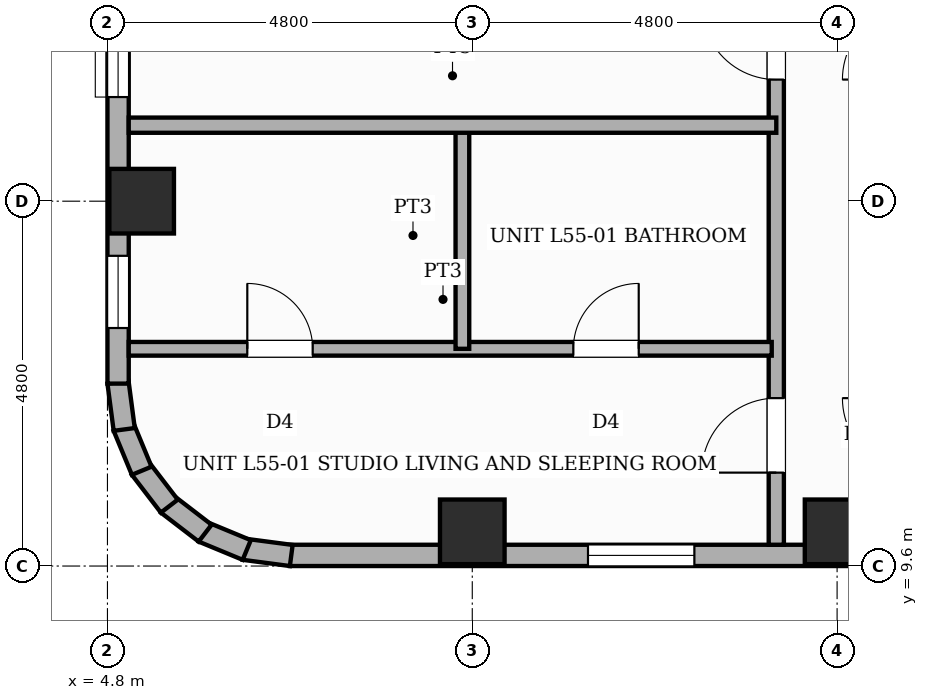
"""IFC4 building model, lengths in metres.
Left out: names, types, materials, properties, quantities, classifications, styles, units other than length and angle.
Written with IfcOpenShell. Run it as: python <this file> out.ifc"""

import sys

from ifc_helpers import new_model, si_unit, direction, frame, frame_2d, origin, origin_2d, place, context, subcontext, project, spatial, rectangle, extrude, element, fill, save


model = new_model("IFC4")
c1 = context("Model", 3, precision=1e-05, world=origin(), true_north=direction((0.0, 1.0)))
c2 = subcontext(c1, "Body", "Model", "MODEL_VIEW")
j1 = project(units=[si_unit("LENGTHUNIT", "METRE"), si_unit("PLANEANGLEUNIT", "RADIAN")], contexts=[c1])
p1 = place(None, origin())
s1 = spatial("IfcSite", under=j1, at=p1, CompositionType="ELEMENT")
p2 = place(p1, origin())
s2 = spatial("IfcBuilding", under=s1, at=p2, CompositionType="ELEMENT")
p3 = place(p2, frame((0.0, 0.0, 211.0)))
s3 = spatial("IfcBuildingStorey", under=s2, at=p3, CompositionType="ELEMENT", Elevation=211.0)
for number, where, z_axis, x_axis in (
    (1, (5.25, 14.4, 0.0), (0.0, 0.0, 1.0), (1.0, 0.0, 0.0)),
    (2, (9.6, 10.05, 0.0), (0.0, 0.0, 1.0), (1.0, 0.0, 0.0)),
    (3, (14.4, 10.05, 0.0), (0.0, 0.0, 1.0), (1.0, 0.0, 0.0)),
):
    element("IfcColumn", number, at=place(p3, frame(where, z_axis=z_axis, x_axis=x_axis)), inside=s3, PredefinedType="COLUMN", context=c2, shape_type="SweptSolid", body=[
        extrude(rectangle(XDim=0.85, YDim=0.85, at=origin_2d()), origin(), (0.0, 0.0, 1.0), 3.6),
    ])
p4 = place(p3, frame((21.6, 9.74, 0.0), z_axis=(0.0, 0.0, 1.0), x_axis=(-1.0, 0.0, 0.0)))
e4 = element("IfcWall", 4, at=p4, inside=s3, PredefinedType="STANDARD", context=c2, shape_type="SweptSolid", body=[
    extrude(rectangle(XDim=14.4, YDim=0.28, at=frame_2d((7.2, 0.0))), origin(), (0.0, 0.0, 1.0), 2.66),
])
p5 = place(p4, frame((9.077, 0.0, 0.65)))
e5 = element("IfcOpeningElement", 5, at=p5, cuts=e4, PredefinedType="OPENING", context=c2, shape_type="SweptSolid", body=[
    extrude(rectangle(XDim=1.4, YDim=1.1, at=frame_2d((0.7, 0.55))), frame((0.0, 0.15, 0.0), z_axis=(0.0, -1.0, 0.0), x_axis=(1.0, 0.0, 0.0)), (0.0, 0.0, 1.0), 0.3),
])
p6 = place(p4, frame((0.308, 0.0, 0.65)))
e6 = element("IfcOpeningElement", 6, at=p6, cuts=e4, PredefinedType="OPENING", context=c2, shape_type="SweptSolid", body=[
    extrude(rectangle(XDim=1.4, YDim=1.1, at=frame_2d((0.7, 0.55))), frame((0.0, 0.15, 0.0), z_axis=(0.0, -1.0, 0.0), x_axis=(1.0, 0.0, 0.0)), (0.0, 0.0, 1.0), 0.3),
])
p7 = place(p3, frame((7.218, 9.739, 0.0), z_axis=(0.0, 0.0, 1.0), x_axis=(-0.9914410257, 0.130555323746, 0.0)))
e7 = element("IfcWall", 7, at=p7, inside=s3, PredefinedType="STANDARD", context=c2, shape_type="SweptSolid", body=[
    extrude(rectangle(XDim=0.626, YDim=0.28, at=frame_2d((0.313, 0.0))), origin(), (0.0, 0.0, 1.0), 3.38),
])
p8 = place(p3, frame((6.632, 9.811, 0.0), z_axis=(0.0, 0.0, 1.0), x_axis=(-0.923836271867, 0.382787856107, 0.0)))
e8 = element("IfcWall", 8, at=p8, inside=s3, PredefinedType="STANDARD", context=c2, shape_type="SweptSolid", body=[
    extrude(rectangle(XDim=0.626, YDim=0.28, at=frame_2d((0.313, 0.0))), origin(), (0.0, 0.0, 1.0), 3.38),
])
for number, where, z_axis, x_axis in (
    (9, (6.085, 10.033, 0.0), (0.0, 0.0, 1.0), (-0.793, 0.609, 0.0)),
    (10, (5.614, 10.388, 0.0), (0.0, 0.0, 1.0), (-0.609, 0.793, 0.0)),
    (11, (5.251, 10.854, 0.0), (0.0, 0.0, 1.0), (-0.383, 0.924, 0.0)),
    (12, (5.021, 11.397, 0.0), (0.0, 0.0, 1.0), (-0.131, 0.991, 0.0)),
):
    element("IfcWall", number, at=place(p3, frame(where, z_axis=z_axis, x_axis=x_axis)), inside=s3, PredefinedType="STANDARD", context=c2, shape_type="SweptSolid", body=[
        extrude(rectangle(XDim=0.626, YDim=0.28, at=frame_2d((0.313, 0.0))), origin(), (0.0, 0.0, 1.0), 3.38),
    ])
p9 = place(p3, frame((4.94, 12.0, 0.0), z_axis=(0.0, 0.0, 1.0), x_axis=(0.0, 1.0, 0.0)))
e13 = element("IfcWall", 13, at=p9, inside=s3, PredefinedType="STANDARD", context=c2, shape_type="SweptSolid", body=[
    extrude(rectangle(XDim=33.6, YDim=0.28, at=frame_2d((16.8, 0.0))), origin(), (0.0, 0.0, 1.0), 2.66),
])
p10 = place(p9, frame((9.05, 0.0, 0.0)))
e14 = element("IfcOpeningElement", 14, at=p10, cuts=e13, PredefinedType="OPENING", context=c2, shape_type="SweptSolid", body=[
    extrude(rectangle(XDim=1.1, YDim=2.15, at=frame_2d((0.55, 1.075))), frame((0.0, 0.15, 0.0), z_axis=(0.0, -1.0, 0.0), x_axis=(1.0, 0.0, 0.0)), (0.0, 0.0, 1.0), 0.3),
])
p11 = place(p9, frame((3.77, 0.0, 0.65)))
e15 = element("IfcOpeningElement", 15, at=p11, cuts=e13, PredefinedType="OPENING", context=c2, shape_type="SweptSolid", body=[
    extrude(rectangle(XDim=1.4, YDim=1.1, at=frame_2d((0.7, 0.55))), frame((0.0, 0.15, 0.0), z_axis=(0.0, -1.0, 0.0), x_axis=(1.0, 0.0, 0.0)), (0.0, 0.0, 1.0), 0.3),
])
p12 = place(p9, frame((0.731, 0.0, 0.45)))
e16 = element("IfcOpeningElement", 16, at=p12, cuts=e13, PredefinedType="OPENING", context=c2, shape_type="SweptSolid", body=[
    extrude(rectangle(XDim=0.95, YDim=1.8, at=frame_2d((0.475, 0.9))), frame((0.0, 0.15, 0.0), z_axis=(0.0, -1.0, 0.0), x_axis=(1.0, 0.0, 0.0)), (0.0, 0.0, 1.0), 0.3),
])
p13 = place(p9, frame((5.772, 0.0, 0.45)))
e17 = element("IfcOpeningElement", 17, at=p13, cuts=e13, PredefinedType="OPENING", context=c2, shape_type="SweptSolid", body=[
    extrude(rectangle(XDim=0.75, YDim=1.8, at=frame_2d((0.375, 0.9))), frame((0.0, 0.15, 0.0), z_axis=(0.0, -1.0, 0.0), x_axis=(1.0, 0.0, 0.0)), (0.0, 0.0, 1.0), 0.3),
])
p14 = place(p9, frame((12.708, 0.0, 0.45)))
e18 = element("IfcOpeningElement", 18, at=p14, cuts=e13, PredefinedType="OPENING", context=c2, shape_type="SweptSolid", body=[
    extrude(rectangle(XDim=0.75, YDim=1.8, at=frame_2d((0.375, 0.9))), frame((0.0, 0.15, 0.0), z_axis=(0.0, -1.0, 0.0), x_axis=(1.0, 0.0, 0.0)), (0.0, 0.0, 1.0), 0.3),
])
p15 = place(p9, frame((14.583, 0.0, 0.65)))
e19 = element("IfcOpeningElement", 19, at=p15, cuts=e13, PredefinedType="OPENING", context=c2, shape_type="SweptSolid", body=[
    extrude(rectangle(XDim=1.4, YDim=1.1, at=frame_2d((0.7, 0.55))), frame((0.0, 0.15, 0.0), z_axis=(0.0, -1.0, 0.0), x_axis=(1.0, 0.0, 0.0)), (0.0, 0.0, 1.0), 0.3),
])
p16 = place(p3, frame((13.6, 9.88, 0.0), z_axis=(0.0, 0.0, 1.0), x_axis=(0.0, 1.0, 0.0)))
e20 = element("IfcWall", 20, at=p16, inside=s3, PredefinedType="PARTITIONING", context=c2, shape_type="SweptSolid", body=[
    extrude(rectangle(XDim=15.87, YDim=0.2, at=frame_2d((7.935, 0.0))), origin(), (0.0, 0.0, 1.0), 3.38),
])
p17 = place(p16, frame((0.949, 0.0, 0.0)))
e21 = element("IfcOpeningElement", 21, at=p17, cuts=e20, PredefinedType="OPENING", context=c2, shape_type="SweptSolid", body=[
    extrude(rectangle(XDim=0.98, YDim=2.18, at=frame_2d((0.49, 1.09))), frame((0.0, 0.11, 0.0), z_axis=(0.0, -1.0, 0.0), x_axis=(1.0, 0.0, 0.0)), (0.0, 0.0, 1.0), 0.22),
])
p18 = place(p16, frame((6.12, 0.0, 0.0)))
e22 = element("IfcOpeningElement", 22, at=p18, cuts=e20, PredefinedType="OPENING", context=c2, shape_type="SweptSolid", body=[
    extrude(rectangle(XDim=0.98, YDim=2.18, at=frame_2d((0.49, 1.09))), frame((0.0, 0.11, 0.0), z_axis=(0.0, -1.0, 0.0), x_axis=(1.0, 0.0, 0.0)), (0.0, 0.0, 1.0), 0.22),
])
p19 = place(p16, frame((11.52, 0.0, 0.0)))
e23 = element("IfcOpeningElement", 23, at=p19, cuts=e20, PredefinedType="OPENING", context=c2, shape_type="SweptSolid", body=[
    extrude(rectangle(XDim=0.98, YDim=2.18, at=frame_2d((0.49, 1.09))), frame((0.0, 0.11, 0.0), z_axis=(0.0, -1.0, 0.0), x_axis=(1.0, 0.0, 0.0)), (0.0, 0.0, 1.0), 0.22),
])
p20 = place(p3, frame((5.08, 12.458, 0.0), z_axis=(0.0, 0.0, 1.0), x_axis=(1.0, 0.0, 0.0)))
e24 = element("IfcWall", 24, at=p20, inside=s3, PredefinedType="PLUMBINGWALL", context=c2, shape_type="SweptSolid", body=[
    extrude(rectangle(XDim=8.46, YDim=0.18, at=frame_2d((4.23, 0.0))), origin(), (0.0, 0.0, 1.0), 3.38),
])
p21 = place(p20, frame((1.56, 0.0, 0.0)))
e25 = element("IfcOpeningElement", 25, at=p21, cuts=e24, PredefinedType="OPENING", context=c2, shape_type="SweptSolid", body=[
    extrude(rectangle(XDim=0.86, YDim=2.1, at=frame_2d((0.43, 1.05))), frame((0.0, 0.1, 0.0), z_axis=(0.0, -1.0, 0.0), x_axis=(1.0, 0.0, 0.0)), (0.0, 0.0, 1.0), 0.2),
])
p22 = place(p20, frame((5.85, 0.0, 0.0)))
e26 = element("IfcOpeningElement", 26, at=p22, cuts=e24, PredefinedType="OPENING", context=c2, shape_type="SweptSolid", body=[
    extrude(rectangle(XDim=0.86, YDim=2.1, at=frame_2d((0.43, 1.05))), frame((0.0, 0.1, 0.0), z_axis=(0.0, -1.0, 0.0), x_axis=(1.0, 0.0, 0.0)), (0.0, 0.0, 1.0), 0.2),
])
p23 = place(p3, frame((9.47, 12.458, 0.0), z_axis=(0.0, 0.0, 1.0), x_axis=(0.0, 1.0, 0.0)))
e27 = element("IfcWall", 27, at=p23, inside=s3, PredefinedType="PLUMBINGWALL", context=c2, shape_type="SweptSolid", body=[
    extrude(rectangle(XDim=2.982, YDim=0.18, at=frame_2d((1.491, 0.0))), origin(), (0.0, 0.0, 1.0), 3.38),
])
p24 = place(p3, frame((5.08, 15.4, 0.0), z_axis=(0.0, 0.0, 1.0), x_axis=(1.0, 0.0, 0.0)))
e28 = element("IfcWall", 28, at=p24, inside=s3, PredefinedType="SOLIDWALL", context=c2, shape_type="SweptSolid", body=[
    extrude(rectangle(XDim=8.52, YDim=0.2, at=frame_2d((4.26, 0.0))), origin(), (0.0, 0.0, 1.0), 3.38),
])
p25 = place(p5, origin())
e29 = element("IfcWindow", 29, at=p25, inside=s3, PartitioningType="SINGLE_PANEL", PredefinedType="WINDOW", context=c2, shape_type="SweptSolid", body=[
    extrude(rectangle(XDim=1.4, YDim=1.1, at=frame_2d((0.7, 0.55))), frame((0.0, 0.03, 0.0), z_axis=(0.0, -1.0, 0.0), x_axis=(1.0, 0.0, 0.0)), (0.0, 0.0, 1.0), 0.06),
])
fill(e5, e29)
p26 = place(p11, origin())
e30 = element("IfcWindow", 30, at=p26, inside=s3, PartitioningType="SINGLE_PANEL", PredefinedType="WINDOW", context=c2, shape_type="SweptSolid", body=[
    extrude(rectangle(XDim=1.4, YDim=1.1, at=frame_2d((0.7, 0.55))), frame((0.0, 0.03, 0.0), z_axis=(0.0, -1.0, 0.0), x_axis=(1.0, 0.0, 0.0)), (0.0, 0.0, 1.0), 0.06),
])
fill(e15, e30)
p27 = place(p12, origin())
e31 = element("IfcWindow", 31, at=p27, inside=s3, PartitioningType="SINGLE_PANEL", PredefinedType="WINDOW", context=c2, shape_type="SweptSolid", body=[
    extrude(rectangle(XDim=0.95, YDim=1.8, at=frame_2d((0.475, 0.9))), frame((0.0, 0.03, 0.0), z_axis=(0.0, -1.0, 0.0), x_axis=(1.0, 0.0, 0.0)), (0.0, 0.0, 1.0), 0.06),
])
fill(e16, e31)
p28 = place(p17, origin())
e32 = element("IfcDoor", 32, at=p28, inside=s3, OperationType="SINGLE_SWING_LEFT", PredefinedType="DOOR", context=c2, shape_type="SweptSolid", body=[
    extrude(rectangle(XDim=0.98, YDim=2.18, at=frame_2d((0.49, 1.09))), frame((0.0, 0.025, 0.0), z_axis=(0.0, -1.0, 0.0), x_axis=(1.0, 0.0, 0.0)), (0.0, 0.0, 1.0), 0.05),
])
fill(e21, e32)
p29 = place(p21, origin())
e33 = element("IfcDoor", 33, at=p29, inside=s3, OperationType="SINGLE_SWING_LEFT", PredefinedType="DOOR", context=c2, shape_type="SweptSolid", body=[
    extrude(rectangle(XDim=0.86, YDim=2.1, at=frame_2d((0.43, 1.05))), frame((0.0, 0.025, 0.0), z_axis=(0.0, -1.0, 0.0), x_axis=(1.0, 0.0, 0.0)), (0.0, 0.0, 1.0), 0.05),
])
fill(e25, e33)
p30 = place(p22, origin())
e34 = element("IfcDoor", 34, at=p30, inside=s3, OperationType="SINGLE_SWING_RIGHT", PredefinedType="DOOR", context=c2, shape_type="SweptSolid", body=[
    extrude(rectangle(XDim=0.86, YDim=2.1, at=frame_2d((0.43, 1.05))), frame((0.0, 0.025, 0.0), z_axis=(0.0, -1.0, 0.0), x_axis=(1.0, 0.0, 0.0)), (0.0, 0.0, 1.0), 0.05),
])
fill(e26, e34)
p31 = place(p18, origin())
e35 = element("IfcDoor", 35, at=p31, inside=s3, OperationType="SINGLE_SWING_RIGHT", PredefinedType="DOOR", context=c2, shape_type="SweptSolid", body=[
    extrude(rectangle(XDim=0.98, YDim=2.18, at=frame_2d((0.49, 1.09))), frame((0.0, 0.025, 0.0), z_axis=(0.0, -1.0, 0.0), x_axis=(1.0, 0.0, 0.0)), (0.0, 0.0, 1.0), 0.05),
])
fill(e22, e35)
save(model, sys.argv[1])
